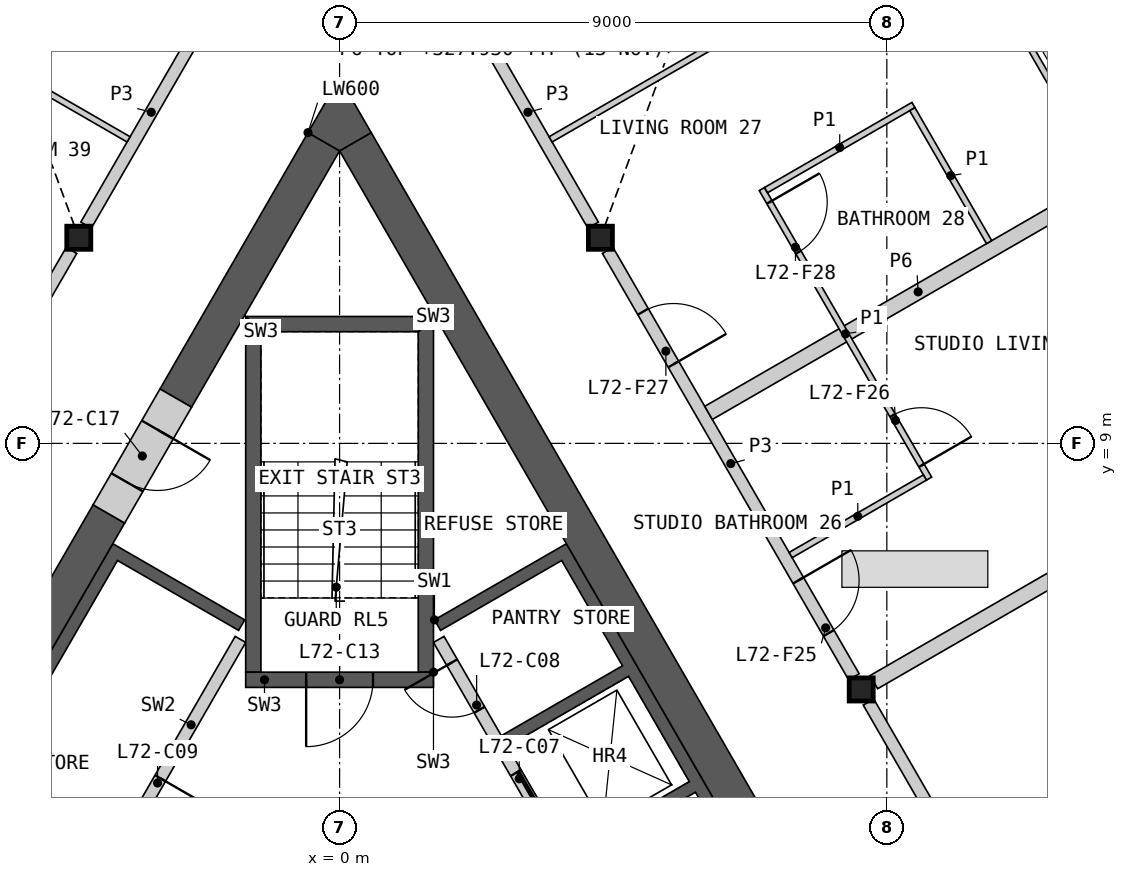
"""IFC4 building model, lengths in metres.
Left out: names, types, materials, properties, quantities, classifications, styles, units other than length and angle.
Written with IfcOpenShell. Run it as: python <this file> out.ifc"""

import sys

from ifc_helpers import new_model, si_unit, direction, frame, frame_2d, origin, origin_2d, place, context, subcontext, project, spatial, polyline, rectangle, i_section, outline, extrude, element, fill, save


model = new_model("IFC4")
c1 = context("Model", 3, precision=1e-05, world=origin(), true_north=direction((0.0, 1.0)))
c2 = subcontext(c1, "Body", "Model", "MODEL_VIEW")
j1 = project(units=[si_unit("LENGTHUNIT", "METRE"), si_unit("PLANEANGLEUNIT", "RADIAN")], contexts=[c1])
p1 = place(None, origin())
s1 = spatial("IfcSite", under=j1, at=p1, CompositionType="ELEMENT")
p2 = place(p1, origin())
s2 = spatial("IfcBuilding", under=s1, at=p2, CompositionType="ELEMENT")
p3 = place(p2, frame((0.0, 0.0, 325.6)))
s3 = spatial("IfcBuildingStorey", under=s2, at=p3, CompositionType="ELEMENT", Elevation=325.6)
for number, where, z_axis, x_axis in (
    (1, (-4.289, 12.382, 0.0), (0.0, 0.0, 1.0), (1.0, 0.0, 0.0)),
    (2, (8.578, 4.953, 0.0), (0.0, 0.0, 1.0), (1.0, 0.0, 0.0)),
    (3, (4.289, 12.382, 0.0), (0.0, 0.0, 1.0), (1.0, 0.0, 0.0)),
):
    element("IfcColumn", number, at=place(p3, frame(where, z_axis=z_axis, x_axis=x_axis)), inside=s3, PredefinedType="COLUMN", context=c2, shape_type="SweptSolid", body=[
        extrude(i_section(OverallWidth=0.396, OverallDepth=0.381, WebThickness=0.019, FlangeThickness=0.03, at=origin_2d()), origin(), (0.0, 0.0, 1.0), 3.4),
    ])
p4 = place(p3, origin())
e4 = element("IfcWall", 4, at=p4, inside=s3, PredefinedType="SHEAR", context=c2, shape_type="SweptSolid", body=[
    extrude(outline(polyline([(1.561, 6.097), (3.731, 7.35), (8.231, -0.444), (6.061, -1.697), (5.96, -1.524), (7.952, -0.374), (6.952, 1.358), (4.96, 0.208), (4.861, 0.381), (6.852, 1.531), (5.852, 3.263), (3.861, 2.113), (3.76, 2.287), (5.752, 3.437), (4.752, 5.169), (2.76, 4.019), (2.66, 4.192), (4.652, 5.342), (3.652, 7.074), (1.66, 5.924), (1.561, 6.097)])), origin(), (0.0, 0.0, 1.0), 3.1),
])
p5 = place(p3, frame((5.817, -1.476, 0.0), z_axis=(0.0, 0.0, 1.0), x_axis=(-0.500002616675, 0.866023893041, 0.0)))
e5 = element("IfcWall", 5, at=p5, inside=s3, PredefinedType="SOLIDWALL", context=c2, shape_type="SweptSolid", body=[
    extrude(rectangle(XDim=8.373, YDim=0.2, at=frame_2d((4.187, 0.0))), origin(), (0.0, 0.0, 1.0), 3.1),
])
p6 = place(p5, frame((0.337, 0.0, 0.0)))
e6 = element("IfcOpeningElement", 6, at=p6, cuts=e5, PredefinedType="OPENING", context=c2, shape_type="SweptSolid", body=[
    extrude(rectangle(XDim=1.1, YDim=2.1, at=frame_2d((0.55, 1.05))), frame((0.0, 0.11, 0.0), z_axis=(0.0, -1.0, 0.0), x_axis=(1.0, 0.0, 0.0)), (0.0, 0.0, 1.0), 0.22),
])
p7 = place(p5, frame((2.537, 0.0, 0.0)))
e7 = element("IfcOpeningElement", 7, at=p7, cuts=e5, PredefinedType="OPENING", context=c2, shape_type="SweptSolid", body=[
    extrude(rectangle(XDim=1.1, YDim=2.1, at=frame_2d((0.55, 1.05))), frame((0.0, 0.11, 0.0), z_axis=(0.0, -1.0, 0.0), x_axis=(1.0, 0.0, 0.0)), (0.0, 0.0, 1.0), 0.22),
])
p8 = place(p5, frame((4.737, 0.0, 0.0)))
e8 = element("IfcOpeningElement", 8, at=p8, cuts=e5, PredefinedType="OPENING", context=c2, shape_type="SweptSolid", body=[
    extrude(rectangle(XDim=1.1, YDim=2.1, at=frame_2d((0.55, 1.05))), frame((0.0, 0.11, 0.0), z_axis=(0.0, -1.0, 0.0), x_axis=(1.0, 0.0, 0.0)), (0.0, 0.0, 1.0), 0.22),
])
p9 = place(p5, frame((7.037, 0.0, 0.0)))
e9 = element("IfcOpeningElement", 9, at=p9, cuts=e5, PredefinedType="OPENING", context=c2, shape_type="SweptSolid", body=[
    extrude(rectangle(XDim=0.9, YDim=2.1, at=frame_2d((0.45, 1.05))), frame((0.0, 0.11, 0.0), z_axis=(0.0, -1.0, 0.0), x_axis=(1.0, 0.0, 0.0)), (0.0, 0.0, 1.0), 0.22),
])
p10 = place(p3, origin())
e10 = element("IfcWall", 10, at=p10, inside=s3, PredefinedType="SHEAR", context=c2, shape_type="SweptSolid", body=[
    extrude(outline(polyline([(-4.96, 0.208), (-7.131, 1.461), (-3.731, 7.35), (-1.561, 6.097), (-1.66, 5.924), (-3.652, 7.074), (-6.852, 1.531), (-4.861, 0.381), (-4.96, 0.208)])), origin(), (0.0, 0.0, 1.0), 3.1),
])
p11 = place(p3, frame((-1.631, 5.776, 0.0), z_axis=(0.0, 0.0, 1.0), x_axis=(-0.499992876559, -0.866029516466, 0.0)))
e11 = element("IfcWall", 11, at=p11, inside=s3, PredefinedType="SOLIDWALL", context=c2, shape_type="SweptSolid", body=[
    extrude(rectangle(XDim=6.486, YDim=0.2, at=frame_2d((3.243, 0.0))), origin(), (0.0, 0.0, 1.0), 3.1),
])
p12 = place(p11, frame((2.637, 0.0, 0.0)))
e12 = element("IfcOpeningElement", 12, at=p12, cuts=e11, PredefinedType="OPENING", context=c2, shape_type="SweptSolid", body=[
    extrude(rectangle(XDim=0.9, YDim=2.1, at=frame_2d((0.45, 1.05))), frame((0.0, 0.11, 0.0), z_axis=(0.0, -1.0, 0.0), x_axis=(1.0, 0.0, 0.0)), (0.0, 0.0, 1.0), 0.22),
])
p13 = place(p3, origin())
e13 = element("IfcWall", 13, at=p13, inside=s3, PredefinedType="SHEAR", context=c2, shape_type="SweptSolid", body=[
    extrude(outline(polyline([(1.544, 5.237), (1.544, 11.087), (1.294, 10.837), (1.294, 5.237), (1.544, 5.237)])), origin(), (0.0, 0.0, 1.0), 3.1),
])
p14 = place(p3, origin())
e14 = element("IfcWall", 14, at=p14, inside=s3, PredefinedType="SHEAR", context=c2, shape_type="SweptSolid", body=[
    extrude(outline(polyline([(1.544, 11.087), (-1.544, 11.087), (-1.294, 10.837), (1.294, 10.837), (1.544, 11.087)])), origin(), (0.0, 0.0, 1.0), 3.1),
])
p15 = place(p3, origin())
e15 = element("IfcWall", 15, at=p15, inside=s3, PredefinedType="SHEAR", context=c2, shape_type="SweptSolid", body=[
    extrude(outline(polyline([(-1.294, 10.837), (-1.544, 11.087), (-1.544, 5.237), (-1.294, 5.237), (-1.294, 10.837)])), origin(), (0.0, 0.0, 1.0), 3.1),
])
p16 = place(p3, frame((1.544, 5.112, 0.0), z_axis=(0.0, 0.0, 1.0), x_axis=(-1.0, 0.0, 0.0)))
e16 = element("IfcWall", 16, at=p16, inside=s3, PredefinedType="SHEAR", context=c2, shape_type="SweptSolid", body=[
    extrude(rectangle(XDim=3.088, YDim=0.25, at=frame_2d((1.544, 0.0))), origin(), (0.0, 0.0, 1.0), 3.1),
])
p17 = place(p16, frame((0.994, 0.0, 0.0)))
e17 = element("IfcOpeningElement", 17, at=p17, cuts=e16, PredefinedType="OPENING", context=c2, shape_type="SweptSolid", body=[
    extrude(rectangle(XDim=1.1, YDim=2.1, at=frame_2d((0.55, 1.05))), frame((0.0, 0.135, 0.0), z_axis=(0.0, -1.0, 0.0), x_axis=(1.0, 0.0, 0.0)), (0.0, 0.0, 1.0), 0.27),
])
p18 = place(p3, frame((8.686, -0.634, 0.0), z_axis=(0.0, 0.0, 1.0), x_axis=(-0.500004601921, 0.866022746848, 0.0)))
e18 = element("IfcWall", 18, at=p18, inside=s3, PredefinedType="SHEAR", context=c2, shape_type="SweptSolid", body=[
    extrude(rectangle(XDim=16.853, YDim=0.6, at=frame_2d((8.426, 0.0))), origin(), (0.0, 0.0, 1.0), 3.1),
])
p19 = place(p3, frame((-3.794, 7.84, 0.0), z_axis=(0.0, 0.0, 1.0), x_axis=(-0.499974747889, -0.866039982607, 0.0)))
e19 = element("IfcWall", 19, at=p19, inside=s3, PredefinedType="SHEAR", context=c2, shape_type="SweptSolid", body=[
    extrude(rectangle(XDim=7.092, YDim=0.6, at=frame_2d((3.546, 0.0))), origin(), (0.0, 0.0, 1.0), 3.1),
])
p20 = place(p3, frame((-0.26, 13.961, 0.0), z_axis=(0.0, 0.0, 1.0), x_axis=(-0.50000604952, -0.866021911064, 0.0)))
e20 = element("IfcWall", 20, at=p20, inside=s3, PredefinedType="SHEAR", context=c2, shape_type="SweptSolid", body=[
    extrude(rectangle(XDim=4.869, YDim=0.6, at=frame_2d((2.434, 0.0))), origin(), (0.0, 0.0, 1.0), 3.1),
])
p21 = place(p3, origin())
e21 = element("IfcWall", 21, at=p21, inside=s3, PredefinedType="SHEAR", context=c2, shape_type="SweptSolid", body=[
    extrude(outline(polyline([(-0.52, 14.111), (0.0, 15.011), (0.52, 14.111), (0.0, 13.811), (-0.52, 14.111)])), origin(), (0.0, 0.0, 1.0), 3.1),
])
p22 = place(p3, frame((-2.694, 9.745, 0.0), z_axis=(0.0, 0.0, 1.0), x_axis=(-0.50002983664, -0.866008176907, 0.0)))
e22 = element("IfcWall", 22, at=p22, inside=s3, PredefinedType="SHEAR", context=c2, shape_type="SweptSolid", body=[
    extrude(rectangle(XDim=2.2, YDim=0.6, at=frame_2d((1.1, 0.0))), origin(), (0.0, 0.0, 1.0), 3.1),
])
p23 = place(p22, frame((0.6, 0.0, 0.0)))
e23 = element("IfcOpeningElement", 23, at=p23, cuts=e22, PredefinedType="OPENING", context=c2, shape_type="SweptSolid", body=[
    extrude(rectangle(XDim=1.0, YDim=2.1, at=frame_2d((0.5, 1.05))), frame((0.0, 0.31, 0.0), z_axis=(0.0, -1.0, 0.0), x_axis=(1.0, 0.0, 0.0)), (0.0, 0.0, 1.0), 0.62),
])
p24 = place(p3, frame((8.786, 5.073, 0.0), z_axis=(0.0, 0.0, 1.0), x_axis=(0.86602139559, 0.500006942333, 0.0)))
e24 = element("IfcWall", 24, at=p24, inside=s3, PredefinedType="PARTITIONING", context=c2, shape_type="SweptSolid", body=[
    extrude(rectangle(XDim=12.505, YDim=0.25, at=frame_2d((6.252, 0.0))), origin(), (0.0, 0.0, 1.0), 2.33),
])
p25 = place(p3, frame((4.409, 12.174, 0.0), z_axis=(0.0, 0.0, 1.0), x_axis=(0.499984266882, -0.866034487114, 0.0)))
e25 = element("IfcWall", 25, at=p25, inside=s3, PredefinedType="PARTITIONING", context=c2, shape_type="SweptSolid", body=[
    extrude(rectangle(XDim=8.099, YDim=0.2, at=frame_2d((4.049, 0.0))), origin(), (0.0, 0.0, 1.0), 3.1),
])
p26 = place(p25, frame((6.269, 0.0, 0.0)))
e26 = element("IfcOpeningElement", 26, at=p26, cuts=e25, PredefinedType="OPENING", context=c2, shape_type="SweptSolid", body=[
    extrude(rectangle(XDim=1.0, YDim=2.1, at=frame_2d((0.5, 1.05))), frame((0.0, 0.11, 0.0), z_axis=(0.0, -1.0, 0.0), x_axis=(1.0, 0.0, 0.0)), (0.0, 0.0, 1.0), 0.22),
])
p27 = place(p25, frame((1.164, 0.0, 0.0)))
e27 = element("IfcOpeningElement", 27, at=p27, cuts=e25, PredefinedType="OPENING", context=c2, shape_type="SweptSolid", body=[
    extrude(rectangle(XDim=1.0, YDim=2.1, at=frame_2d((0.5, 1.05))), frame((0.0, 0.11, 0.0), z_axis=(0.0, -1.0, 0.0), x_axis=(1.0, 0.0, 0.0)), (0.0, 0.0, 1.0), 0.22),
])
p28 = place(p3, frame((-8.458, 5.16, 0.0), z_axis=(0.0, 0.0, 1.0), x_axis=(0.499984266882, 0.866034487114, 0.0)))
e28 = element("IfcWall", 28, at=p28, inside=s3, PredefinedType="PARTITIONING", context=c2, shape_type="SweptSolid", body=[
    extrude(rectangle(XDim=8.099, YDim=0.2, at=frame_2d((4.049, 0.0))), origin(), (0.0, 0.0, 1.0), 3.1),
])
p29 = place(p28, frame((5.935, 0.0, 0.0)))
e29 = element("IfcOpeningElement", 29, at=p29, cuts=e28, PredefinedType="OPENING", context=c2, shape_type="SweptSolid", body=[
    extrude(rectangle(XDim=1.0, YDim=2.1, at=frame_2d((0.5, 1.05))), frame((0.0, 0.11, 0.0), z_axis=(0.0, -1.0, 0.0), x_axis=(1.0, 0.0, 0.0)), (0.0, 0.0, 1.0), 0.22),
])
p30 = place(p28, frame((0.83, 0.0, 0.0)))
e30 = element("IfcOpeningElement", 30, at=p30, cuts=e28, PredefinedType="OPENING", context=c2, shape_type="SweptSolid", body=[
    extrude(rectangle(XDim=1.0, YDim=2.1, at=frame_2d((0.5, 1.05))), frame((0.0, 0.11, 0.0), z_axis=(0.0, -1.0, 0.0), x_axis=(1.0, 0.0, 0.0)), (0.0, 0.0, 1.0), 0.22),
])
p31 = place(p3, frame((8.698, 4.745, 0.0), z_axis=(0.0, 0.0, 1.0), x_axis=(0.499984266882, -0.866034487114, 0.0)))
e31 = element("IfcWall", 31, at=p31, inside=s3, PredefinedType="PARTITIONING", context=c2, shape_type="SweptSolid", body=[
    extrude(rectangle(XDim=8.099, YDim=0.2, at=frame_2d((4.049, 0.0))), origin(), (0.0, 0.0, 1.0), 3.1),
])
p32 = place(p31, frame((1.976, 0.0, 0.0)))
e32 = element("IfcOpeningElement", 32, at=p32, cuts=e31, PredefinedType="OPENING", context=c2, shape_type="SweptSolid", body=[
    extrude(rectangle(XDim=1.0, YDim=2.1, at=frame_2d((0.5, 1.05))), frame((0.0, 0.11, 0.0), z_axis=(0.0, -1.0, 0.0), x_axis=(1.0, 0.0, 0.0)), (0.0, 0.0, 1.0), 0.22),
])
p33 = place(p3, frame((6.068, 9.501, 0.0), z_axis=(0.0, 0.0, 1.0), x_axis=(0.866022671543, 0.50000473235, 0.0)))
e33 = element("IfcWall", 33, at=p33, inside=s3, PredefinedType="PARTITIONING", context=c2, shape_type="SweptSolid", body=[
    extrude(rectangle(XDim=7.961, YDim=0.25, at=frame_2d((3.98, 0.0))), origin(), (0.0, 0.0, 1.0), 2.33),
])
for number, where, z_axis, x_axis in (
    (34, (2.025, 16.303, 0.0), (0.0, 0.0, 1.0), (0.5, -0.866, 0.0)),
    (35, (-4.169, 12.59, 0.0), (0.0, 0.0, 1.0), (0.5, 0.866, 0.0)),
):
    element("IfcWall", number, at=place(p3, frame(where, z_axis=z_axis, x_axis=x_axis)), inside=s3, PredefinedType="PARTITIONING", context=c2, shape_type="SweptSolid", body=[
        extrude(rectangle(XDim=4.288, YDim=0.2, at=frame_2d((2.144, 0.0))), origin(), (0.0, 0.0, 1.0), 3.1),
    ])
p34 = place(p3, frame((-14.417, 20.32, 0.0), z_axis=(0.0, 0.0, 1.0), x_axis=(0.866021216079, -0.500007253249, 0.0)))
e36 = element("IfcWall", 36, at=p34, inside=s3, PredefinedType="PARTITIONING", context=c2, shape_type="SweptSolid", body=[
    extrude(rectangle(XDim=12.639, YDim=0.1, at=frame_2d((6.32, 0.0))), origin(), (0.0, 0.0, 1.0), 2.33),
])
p35 = place(p34, frame((3.375, 0.0, 0.0)))
e37 = element("IfcOpeningElement", 37, at=p35, cuts=e36, PredefinedType="OPENING", context=c2, shape_type="SweptSolid", body=[
    extrude(rectangle(XDim=0.95, YDim=2.1, at=frame_2d((0.475, 1.05))), frame((0.0, 0.06, 0.0), z_axis=(0.0, -1.0, 0.0), x_axis=(1.0, 0.0, 0.0)), (0.0, 0.0, 1.0), 0.12),
])
p36 = place(p3, frame((3.47, 14.0, 0.0), z_axis=(0.0, 0.0, 1.0), x_axis=(0.866021216079, 0.500007253249, 0.0)))
e38 = element("IfcWall", 38, at=p36, inside=s3, PredefinedType="PARTITIONING", context=c2, shape_type="SweptSolid", body=[
    extrude(rectangle(XDim=12.639, YDim=0.1, at=frame_2d((6.32, 0.0))), origin(), (0.0, 0.0, 1.0), 2.33),
])
p37 = place(p36, frame((8.314, 0.0, 0.0)))
e39 = element("IfcOpeningElement", 39, at=p37, cuts=e38, PredefinedType="OPENING", context=c2, shape_type="SweptSolid", body=[
    extrude(rectangle(XDim=0.95, YDim=2.1, at=frame_2d((0.475, 1.05))), frame((0.0, 0.06, 0.0), z_axis=(0.0, -1.0, 0.0), x_axis=(1.0, 0.0, 0.0)), (0.0, 0.0, 1.0), 0.12),
])
p38 = place(p3, frame((11.262, 0.504, 0.0), z_axis=(0.0, 0.0, 1.0), x_axis=(0.866020217342, 0.500008983073, 0.0)))
e40 = element("IfcWall", 40, at=p38, inside=s3, PredefinedType="PARTITIONING", context=c2, shape_type="SweptSolid", body=[
    extrude(rectangle(XDim=7.966, YDim=0.1, at=frame_2d((3.983, 0.0))), origin(), (0.0, 0.0, 1.0), 2.33),
])
p39 = place(p38, frame((5.362, 0.0, 0.0)))
e41 = element("IfcOpeningElement", 41, at=p39, cuts=e40, PredefinedType="OPENING", context=c2, shape_type="SweptSolid", body=[
    extrude(rectangle(XDim=0.95, YDim=2.1, at=frame_2d((0.475, 1.05))), frame((0.0, 0.06, 0.0), z_axis=(0.0, -1.0, 0.0), x_axis=(1.0, 0.0, 0.0)), (0.0, 0.0, 1.0), 0.12),
])
p40 = place(p3, frame((6.944, 13.183, 0.0), z_axis=(0.0, 0.0, 1.0), x_axis=(0.499996545922, -0.866027397988, 0.0)))
e42 = element("IfcWall", 42, at=p40, inside=s3, PredefinedType="PARTITIONING", context=c2, shape_type="SweptSolid", body=[
    extrude(rectangle(XDim=5.5, YDim=0.1, at=frame_2d((2.75, 0.0))), origin(), (0.0, 0.0, 1.0), 2.33),
])
p41 = place(p40, frame((4.3, 0.0, 0.0)))
e43 = element("IfcOpeningElement", 43, at=p41, cuts=e42, PredefinedType="OPENING", context=c2, shape_type="SweptSolid", body=[
    extrude(rectangle(XDim=0.95, YDim=2.1, at=frame_2d((0.475, 1.05))), frame((0.0, 0.06, 0.0), z_axis=(0.0, -1.0, 0.0), x_axis=(1.0, 0.0, 0.0)), (0.0, 0.0, 1.0), 0.12),
])
p42 = place(p40, frame((0.25, 0.0, 0.0)))
e44 = element("IfcOpeningElement", 44, at=p42, cuts=e42, PredefinedType="OPENING", context=c2, shape_type="SweptSolid", body=[
    extrude(rectangle(XDim=0.95, YDim=2.1, at=frame_2d((0.475, 1.05))), frame((0.0, 0.06, 0.0), z_axis=(0.0, -1.0, 0.0), x_axis=(1.0, 0.0, 0.0)), (0.0, 0.0, 1.0), 0.12),
])
p43 = place(p3, frame((10.065, 17.75, 0.0), z_axis=(0.0, 0.0, 1.0), x_axis=(0.499989096993, -0.866031698547, 0.0)))
e45 = element("IfcWall", 45, at=p43, inside=s3, PredefinedType="PARTITIONING", context=c2, shape_type="SweptSolid", body=[
    extrude(rectangle(XDim=5.02, YDim=0.1, at=frame_2d((2.51, 0.0))), origin(), (0.0, 0.0, 1.0), 2.33),
])
p44 = place(p43, frame((0.862, 0.0, 0.0)))
e46 = element("IfcOpeningElement", 46, at=p44, cuts=e45, PredefinedType="OPENING", context=c2, shape_type="SweptSolid", body=[
    extrude(rectangle(XDim=0.95, YDim=2.1, at=frame_2d((0.475, 1.05))), frame((0.0, 0.06, 0.0), z_axis=(0.0, -1.0, 0.0), x_axis=(1.0, 0.0, 0.0)), (0.0, 0.0, 1.0), 0.12),
])
p45 = place(p3, frame((7.013, 13.165, 0.0), z_axis=(0.0, 0.0, 1.0), x_axis=(0.866034573852, 0.49998411664, 0.0)))
e47 = element("IfcWall", 47, at=p45, inside=s3, PredefinedType="PARTITIONING", context=c2, shape_type="SweptSolid", body=[
    extrude(rectangle(XDim=2.8, YDim=0.1, at=frame_2d((1.4, 0.0))), origin(), (0.0, 0.0, 1.0), 2.33),
])
p46 = place(p3, frame((7.418, 7.163, 0.0), z_axis=(0.0, 0.0, 1.0), x_axis=(0.866054858364, 0.499948979701, 0.0)))
e48 = element("IfcWall", 48, at=p46, inside=s3, PredefinedType="PARTITIONING", context=c2, shape_type="SweptSolid", body=[
    extrude(rectangle(XDim=2.55, YDim=0.1, at=frame_2d((1.275, 0.0))), origin(), (0.0, 0.0, 1.0), 2.33),
])
p47 = place(p3, frame((9.419, 14.497, 0.0), z_axis=(0.0, 0.0, 1.0), x_axis=(0.499976333282, -0.866039067339, 0.0)))
e49 = element("IfcWall", 49, at=p47, inside=s3, PredefinedType="PARTITIONING", context=c2, shape_type="SweptSolid", body=[
    extrude(rectangle(XDim=2.525, YDim=0.1, at=frame_2d((1.262, 0.0))), origin(), (0.0, 0.0, 1.0), 2.33),
])
p48 = place(p8, origin())
e50 = element("IfcDoor", 50, at=p48, inside=s3, OperationType="SLIDING_TO_LEFT", PredefinedType="DOOR", context=c2, shape_type="SweptSolid", body=[
    extrude(rectangle(XDim=1.1, YDim=2.1, at=frame_2d((0.55, 1.05))), frame((0.0, 0.025, 0.0), z_axis=(0.0, -1.0, 0.0), x_axis=(1.0, 0.0, 0.0)), (0.0, 0.0, 1.0), 0.05),
])
fill(e8, e50)
p49 = place(p9, origin())
e51 = element("IfcDoor", 51, at=p49, inside=s3, OperationType="SINGLE_SWING_RIGHT", PredefinedType="DOOR", context=c2, shape_type="SweptSolid", body=[
    extrude(rectangle(XDim=0.9, YDim=2.1, at=frame_2d((0.45, 1.05))), frame((0.0, 0.025, 0.0), z_axis=(0.0, -1.0, 0.0), x_axis=(1.0, 0.0, 0.0)), (0.0, 0.0, 1.0), 0.05),
])
fill(e9, e51)
p50 = place(p12, origin())
e52 = element("IfcDoor", 52, at=p50, inside=s3, OperationType="SINGLE_SWING_LEFT", PredefinedType="DOOR", context=c2, shape_type="SweptSolid", body=[
    extrude(rectangle(XDim=0.9, YDim=2.1, at=frame_2d((0.45, 1.05))), frame((0.0, 0.025, 0.0), z_axis=(0.0, -1.0, 0.0), x_axis=(1.0, 0.0, 0.0)), (0.0, 0.0, 1.0), 0.05),
])
fill(e12, e52)
p51 = place(p17, origin())
e53 = element("IfcDoor", 53, at=p51, inside=s3, OperationType="SINGLE_SWING_RIGHT", PredefinedType="DOOR", context=c2, shape_type="SweptSolid", body=[
    extrude(rectangle(XDim=1.1, YDim=2.1, at=frame_2d((0.55, 1.05))), frame((0.0, 0.025, 0.0), z_axis=(0.0, -1.0, 0.0), x_axis=(1.0, 0.0, 0.0)), (0.0, 0.0, 1.0), 0.05),
])
fill(e17, e53)
p52 = place(p23, origin())
e54 = element("IfcDoor", 54, at=p52, inside=s3, OperationType="SINGLE_SWING_LEFT", PredefinedType="DOOR", context=c2, shape_type="SweptSolid", body=[
    extrude(rectangle(XDim=1.0, YDim=2.1, at=frame_2d((0.5, 1.05))), frame((0.0, 0.055, 0.0), z_axis=(0.0, -1.0, 0.0), x_axis=(1.0, 0.0, 0.0)), (0.0, 0.0, 1.0), 0.05),
])
fill(e23, e54)
p53 = place(p26, origin())
e55 = element("IfcDoor", 55, at=p53, inside=s3, OperationType="SINGLE_SWING_LEFT", PredefinedType="DOOR", context=c2, shape_type="SweptSolid", body=[
    extrude(rectangle(XDim=1.0, YDim=2.1, at=frame_2d((0.5, 1.05))), frame((0.0, 0.025, 0.0), z_axis=(0.0, -1.0, 0.0), x_axis=(1.0, 0.0, 0.0)), (0.0, 0.0, 1.0), 0.05),
])
fill(e26, e55)
p54 = place(p41, origin())
e56 = element("IfcDoor", 56, at=p54, inside=s3, OperationType="SINGLE_SWING_RIGHT", PredefinedType="DOOR", context=c2, shape_type="SweptSolid", body=[
    extrude(rectangle(XDim=0.95, YDim=2.1, at=frame_2d((0.475, 1.05))), frame((0.0, 0.025, 0.0), z_axis=(0.0, -1.0, 0.0), x_axis=(1.0, 0.0, 0.0)), (0.0, 0.0, 1.0), 0.05),
])
fill(e43, e56)
p55 = place(p27, origin())
e57 = element("IfcDoor", 57, at=p55, inside=s3, OperationType="SINGLE_SWING_RIGHT", PredefinedType="DOOR", context=c2, shape_type="SweptSolid", body=[
    extrude(rectangle(XDim=1.0, YDim=2.1, at=frame_2d((0.5, 1.05))), frame((0.0, 0.025, 0.0), z_axis=(0.0, -1.0, 0.0), x_axis=(1.0, 0.0, 0.0)), (0.0, 0.0, 1.0), 0.05),
])
fill(e27, e57)
p56 = place(p42, origin())
e58 = element("IfcDoor", 58, at=p56, inside=s3, OperationType="SINGLE_SWING_LEFT", PredefinedType="DOOR", context=c2, shape_type="SweptSolid", body=[
    extrude(rectangle(XDim=0.95, YDim=2.1, at=frame_2d((0.475, 1.05))), frame((0.0, 0.025, 0.0), z_axis=(0.0, -1.0, 0.0), x_axis=(1.0, 0.0, 0.0)), (0.0, 0.0, 1.0), 0.05),
])
fill(e44, e58)
save(model, sys.argv[1])
